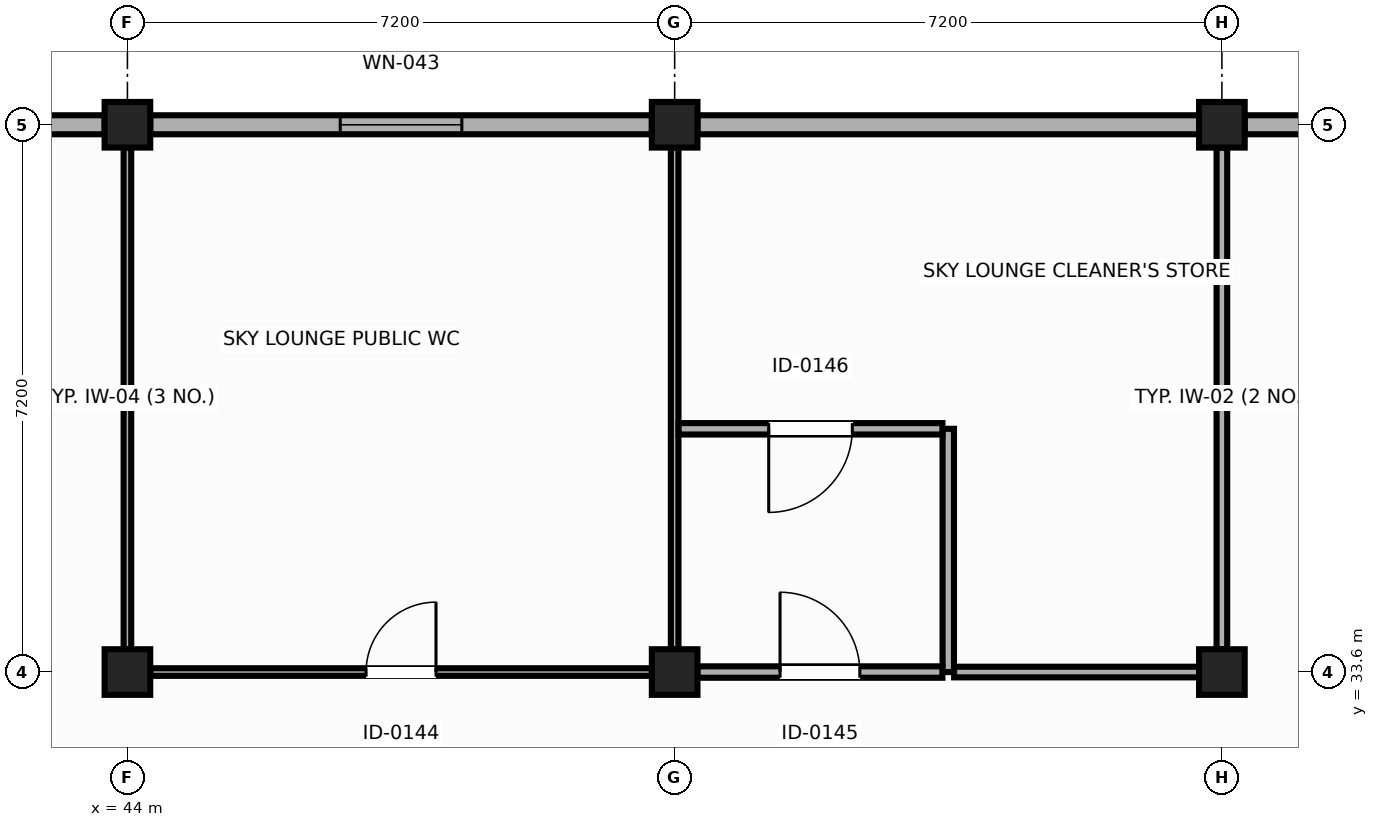
"""IFC4 building model, lengths in metres.
Left out: names, types, materials, properties, quantities, classifications, styles, units other than length and angle.
Written with IfcOpenShell. Run it as: python <this file> out.ifc"""

import sys

from ifc_helpers import new_model, si_unit, direction, frame, frame_2d, origin, origin_2d, place, context, subcontext, project, spatial, rectangle, extrude, element, fill, save


model = new_model("IFC4")
c1 = context("Model", 3, precision=1e-05, world=origin(), true_north=direction((0.0, 1.0)))
c2 = subcontext(c1, "Body", "Model", "MODEL_VIEW")
j1 = project(units=[si_unit("LENGTHUNIT", "METRE"), si_unit("PLANEANGLEUNIT", "RADIAN")], contexts=[c1])
p1 = place(None, origin())
s1 = spatial("IfcSite", under=j1, at=p1, CompositionType="ELEMENT")
p2 = place(p1, origin())
s2 = spatial("IfcBuilding", under=s1, at=p2, CompositionType="ELEMENT")
p3 = place(p2, frame((0.0, 0.0, 14.4)))
s3 = spatial("IfcBuildingStorey", under=s2, at=p3, CompositionType="ELEMENT", Elevation=14.4)
for number, where, z_axis, x_axis in (
    (1, (44.0, 33.6, 0.0), (0.0, 0.0, 1.0), (0.0, 1.0, 0.0)),
    (2, (51.2, 33.6, 0.0), (0.0, 0.0, 1.0), (1.0, 0.0, 0.0)),
    (3, (58.4, 33.6, 0.0), (0.0, 0.0, 1.0), (1.0, 0.0, 0.0)),
    (4, (44.0, 40.8, 0.0), (0.0, 0.0, 1.0), (1.0, 0.0, 0.0)),
    (5, (51.2, 40.8, 0.0), (0.0, 0.0, 1.0), (1.0, 0.0, 0.0)),
    (6, (58.4, 40.8, 0.0), (0.0, 0.0, 1.0), (0.0, 1.0, 0.0)),
):
    element("IfcColumn", number, at=place(p3, frame(where, z_axis=z_axis, x_axis=x_axis)), inside=s3, PredefinedType="COLUMN", context=c2, shape_type="SweptSolid", body=[
        extrude(rectangle(XDim=0.6, YDim=0.6, at=origin_2d()), origin(), (0.0, 0.0, 1.0), 4.28),
    ])
p4 = place(p3, frame((37.1, 40.8, 0.0), z_axis=(0.0, 0.0, 1.0), x_axis=(1.0, 0.0, 0.0)))
e7 = element("IfcWall", 7, at=p4, inside=s3, PredefinedType="SOLIDWALL", context=c2, shape_type="SweptSolid", body=[
    extrude(rectangle(XDim=6.6, YDim=0.25, at=frame_2d((3.3, 0.0))), origin(), (0.0, 0.0, 1.0), 3.775),
])
p5 = place(p4, frame((1.5, 0.0, 1.8)))
e8 = element("IfcOpeningElement", 8, at=p5, cuts=e7, PredefinedType="OPENING", context=c2, shape_type="SweptSolid", body=[
    extrude(rectangle(XDim=3.6, YDim=1.2, at=frame_2d((1.8, 0.6))), frame((0.0, 0.135, 0.0), z_axis=(0.0, -1.0, 0.0), x_axis=(1.0, 0.0, 0.0)), (0.0, 0.0, 1.0), 0.27),
])
p6 = place(p3, frame((44.3, 40.8, 0.0), z_axis=(0.0, 0.0, 1.0), x_axis=(1.0, 0.0, 0.0)))
e9 = element("IfcWall", 9, at=p6, inside=s3, PredefinedType="SOLIDWALL", context=c2, shape_type="SweptSolid", body=[
    extrude(rectangle(XDim=6.6, YDim=0.25, at=frame_2d((3.3, 0.0))), origin(), (0.0, 0.0, 1.0), 3.775),
])
p7 = place(p6, frame((2.5, 0.0, 0.9)))
e10 = element("IfcOpeningElement", 10, at=p7, cuts=e9, PredefinedType="OPENING", context=c2, shape_type="SweptSolid", body=[
    extrude(rectangle(XDim=1.6, YDim=2.4, at=frame_2d((0.8, 1.2))), frame((0.0, 0.135, 0.0), z_axis=(0.0, -1.0, 0.0), x_axis=(1.0, 0.0, 0.0)), (0.0, 0.0, 1.0), 0.27),
])
p8 = place(p3, frame((51.5, 40.8, 0.0), z_axis=(0.0, 0.0, 1.0), x_axis=(1.0, 0.0, 0.0)))
e11 = element("IfcWall", 11, at=p8, inside=s3, PredefinedType="SOLIDWALL", context=c2, shape_type="SweptSolid", body=[
    extrude(rectangle(XDim=6.6, YDim=0.25, at=frame_2d((3.3, 0.0))), origin(), (0.0, 0.0, 1.0), 3.775),
])
p9 = place(p3, frame((58.7, 40.8, 0.0), z_axis=(0.0, 0.0, 1.0), x_axis=(1.0, 0.0, 0.0)))
e12 = element("IfcWall", 12, at=p9, inside=s3, PredefinedType="SOLIDWALL", context=c2, shape_type="SweptSolid", body=[
    extrude(rectangle(XDim=6.6, YDim=0.25, at=frame_2d((3.3, 0.0))), origin(), (0.0, 0.0, 1.0), 3.775),
])
p10 = place(p9, frame((2.3, 0.0, 0.9)))
e13 = element("IfcOpeningElement", 13, at=p10, cuts=e12, PredefinedType="OPENING", context=c2, shape_type="SweptSolid", body=[
    extrude(rectangle(XDim=2.0, YDim=2.4, at=frame_2d((1.0, 1.2))), frame((0.0, 0.135, 0.0), z_axis=(0.0, -1.0, 0.0), x_axis=(1.0, 0.0, 0.0)), (0.0, 0.0, 1.0), 0.27),
])
for number, where, z_axis, x_axis in (
    (14, (51.2, 33.9, 0.0), (0.0, 0.0, 1.0), (0.0, 1.0, 0.0)),
    (15, (44.0, 40.5, 0.0), (0.0, 0.0, 1.0), (0.0, -1.0, 0.0)),
):
    element("IfcWall", number, at=place(p3, frame(where, z_axis=z_axis, x_axis=x_axis)), inside=s3, PredefinedType="PARTITIONING", context=c2, shape_type="SweptSolid", body=[
        extrude(rectangle(XDim=6.6, YDim=0.1, at=frame_2d((3.3, 0.0))), origin(), (0.0, 0.0, 1.0), 3.575),
    ])
p11 = place(p3, frame((44.3, 33.6, 0.0), z_axis=(0.0, 0.0, 1.0), x_axis=(1.0, 0.0, 0.0)))
e16 = element("IfcWall", 16, at=p11, inside=s3, PredefinedType="PARTITIONING", context=c2, shape_type="SweptSolid", body=[
    extrude(rectangle(XDim=6.6, YDim=0.1, at=frame_2d((3.3, 0.0))), origin(), (0.0, 0.0, 1.0), 3.775),
])
p12 = place(p11, frame((2.84, 0.0, 0.0)))
e17 = element("IfcOpeningElement", 17, at=p12, cuts=e16, PredefinedType="OPENING", context=c2, shape_type="SweptSolid", body=[
    extrude(rectangle(XDim=0.92, YDim=2.1, at=frame_2d((0.46, 1.05))), frame((0.0, 0.06, 0.0), z_axis=(0.0, -1.0, 0.0), x_axis=(1.0, 0.0, 0.0)), (0.0, 0.0, 1.0), 0.12),
])
p13 = place(p3, frame((54.8, 33.6, 0.0), z_axis=(0.0, 0.0, 1.0), x_axis=(0.0, 1.0, 0.0)))
e18 = element("IfcWall", 18, at=p13, inside=s3, PredefinedType="PARTITIONING", context=c2, shape_type="SweptSolid", body=[
    extrude(rectangle(XDim=3.2, YDim=0.15, at=frame_2d((1.6, 0.0))), origin(), (0.0, 0.0, 1.0), 3.775),
])
p14 = place(p3, frame((54.723, 36.8, 0.0), z_axis=(0.0, 0.0, 1.0), x_axis=(-1.0, 0.0, 0.0)))
e19 = element("IfcWall", 19, at=p14, inside=s3, PredefinedType="PARTITIONING", context=c2, shape_type="SweptSolid", body=[
    extrude(rectangle(XDim=3.471, YDim=0.15, at=frame_2d((1.735, 0.0))), origin(), (0.0, 0.0, 1.0), 3.575),
])
p15 = place(p14, frame((1.186, 0.0, 0.0)))
e20 = element("IfcOpeningElement", 20, at=p15, cuts=e19, PredefinedType="OPENING", context=c2, shape_type="SweptSolid", body=[
    extrude(rectangle(XDim=1.1, YDim=2.15, at=frame_2d((0.55, 1.075))), frame((0.0, 0.085, 0.0), z_axis=(0.0, -1.0, 0.0), x_axis=(1.0, 0.0, 0.0)), (0.0, 0.0, 1.0), 0.17),
])
p16 = place(p3, frame((51.5, 33.6, 0.0), z_axis=(0.0, 0.0, 1.0), x_axis=(1.0, 0.0, 0.0)))
e21 = element("IfcWall", 21, at=p16, inside=s3, PredefinedType="PARTITIONING", context=c2, shape_type="SweptSolid", body=[
    extrude(rectangle(XDim=3.223, YDim=0.15, at=frame_2d((1.611, 0.0))), origin(), (0.0, 0.0, 1.0), 3.775),
])
p17 = place(p16, frame((1.086, 0.0, 0.0)))
e22 = element("IfcOpeningElement", 22, at=p17, cuts=e21, PredefinedType="OPENING", context=c2, shape_type="SweptSolid", body=[
    extrude(rectangle(XDim=1.05, YDim=2.12, at=frame_2d((0.525, 1.06))), frame((0.0, 0.085, 0.0), z_axis=(0.0, -1.0, 0.0), x_axis=(1.0, 0.0, 0.0)), (0.0, 0.0, 1.0), 0.17),
])
p18 = place(p3, frame((58.4, 40.5, 0.0), z_axis=(0.0, 0.0, 1.0), x_axis=(0.0, -1.0, 0.0)))
e23 = element("IfcWall", 23, at=p18, inside=s3, PredefinedType="PARTITIONING", context=c2, shape_type="SweptSolid", body=[
    extrude(rectangle(XDim=6.6, YDim=0.14, at=frame_2d((3.3, 0.0))), origin(), (0.0, 0.0, 1.0), 3.575),
])
p19 = place(p3, frame((58.1, 33.6, 0.0), z_axis=(0.0, 0.0, 1.0), x_axis=(-1.0, 0.0, 0.0)))
e24 = element("IfcWall", 24, at=p19, inside=s3, PredefinedType="PARTITIONING", context=c2, shape_type="SweptSolid", body=[
    extrude(rectangle(XDim=3.223, YDim=0.14, at=frame_2d((1.612, 0.0))), origin(), (0.0, 0.0, 1.0), 3.775),
])
p20 = place(p7, origin())
e25 = element("IfcWindow", 25, at=p20, inside=s3, PartitioningType="SINGLE_PANEL", PredefinedType="WINDOW", context=c2, shape_type="SweptSolid", body=[
    extrude(rectangle(XDim=1.6, YDim=2.4, at=frame_2d((0.8, 1.2))), frame((0.0, 0.03, 0.0), z_axis=(0.0, -1.0, 0.0), x_axis=(1.0, 0.0, 0.0)), (0.0, 0.0, 1.0), 0.06),
])
fill(e10, e25)
p21 = place(p12, origin())
e26 = element("IfcDoor", 26, at=p21, inside=s3, OperationType="SINGLE_SWING_RIGHT", PredefinedType="DOOR", context=c2, shape_type="SweptSolid", body=[
    extrude(rectangle(XDim=0.92, YDim=2.1, at=frame_2d((0.46, 1.05))), frame((0.0, 0.025, 0.0), z_axis=(0.0, -1.0, 0.0), x_axis=(1.0, 0.0, 0.0)), (0.0, 0.0, 1.0), 0.05),
])
fill(e17, e26)
p22 = place(p17, origin())
e27 = element("IfcDoor", 27, at=p22, inside=s3, OperationType="SINGLE_SWING_LEFT", PredefinedType="DOOR", context=c2, shape_type="SweptSolid", body=[
    extrude(rectangle(XDim=1.05, YDim=2.12, at=frame_2d((0.525, 1.06))), frame((0.0, 0.025, 0.0), z_axis=(0.0, -1.0, 0.0), x_axis=(1.0, 0.0, 0.0)), (0.0, 0.0, 1.0), 0.05),
])
fill(e22, e27)
p23 = place(p15, origin())
e28 = element("IfcDoor", 28, at=p23, inside=s3, OperationType="SINGLE_SWING_RIGHT", PredefinedType="DOOR", context=c2, shape_type="SweptSolid", body=[
    extrude(rectangle(XDim=1.1, YDim=2.15, at=frame_2d((0.55, 1.075))), frame((0.0, 0.025, 0.0), z_axis=(0.0, -1.0, 0.0), x_axis=(1.0, 0.0, 0.0)), (0.0, 0.0, 1.0), 0.05),
])
fill(e20, e28)
save(model, sys.argv[1])
